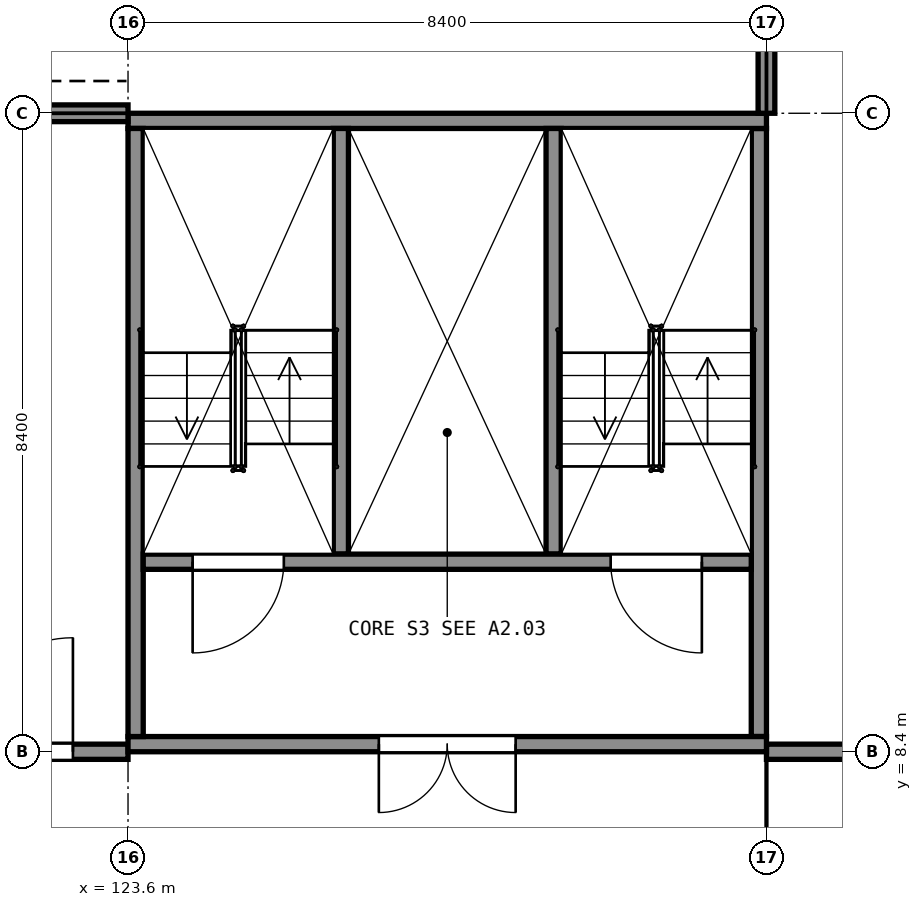
"""IFC4 building model, lengths in metres.
Left out: names, types, materials, properties, quantities, classifications, styles, units other than length and angle.
Written with IfcOpenShell. Run it as: python <this file> out.ifc"""

import sys

from ifc_helpers import new_model, si_unit, direction, frame, frame_2d, origin, place, context, subcontext, project, spatial, rectangle, extrude, element, fill, save


model = new_model("IFC4")
c1 = context("Model", 3, precision=1e-05, world=origin(), true_north=direction((0.0, 1.0)))
c2 = subcontext(c1, "Body", "Model", "MODEL_VIEW")
j1 = project(units=[si_unit("LENGTHUNIT", "METRE"), si_unit("PLANEANGLEUNIT", "RADIAN")], contexts=[c1])
p1 = place(None, origin())
s1 = spatial("IfcSite", under=j1, at=p1, CompositionType="ELEMENT")
p2 = place(p1, origin())
s2 = spatial("IfcBuilding", under=s1, at=p2, CompositionType="ELEMENT")
p3 = place(p2, frame((0.0, 0.0, 20.0)))
s3 = spatial("IfcBuildingStorey", under=s2, at=p3, CompositionType="ELEMENT", Elevation=20.0)
p4 = place(p3, frame((123.6, 8.5, 0.0), z_axis=(0.0, 0.0, 1.0), x_axis=(1.0, 0.0, 0.0)))
e1 = element("IfcWall", 1, at=p4, inside=s3, PredefinedType="SHEAR", context=c2, shape_type="SweptSolid", body=[
    extrude(rectangle(XDim=8.4, YDim=0.2, at=frame_2d((4.2, 0.0))), origin(), (0.0, 0.0, 1.0), 5.0),
])
p5 = place(p4, frame((3.3, 0.0, 0.0)))
e2 = element("IfcOpeningElement", 2, at=p5, cuts=e1, PredefinedType="OPENING", context=c2, shape_type="SweptSolid", body=[
    extrude(rectangle(XDim=1.8, YDim=2.1, at=frame_2d((0.9, 1.05))), frame((0.0, 0.11, 0.0), z_axis=(0.0, -1.0, 0.0), x_axis=(1.0, 0.0, 0.0)), (0.0, 0.0, 1.0), 0.22),
])
p6 = place(p3, frame((123.6, 16.7, 0.0), z_axis=(0.0, 0.0, 1.0), x_axis=(1.0, 0.0, 0.0)))
e3 = element("IfcWall", 3, at=p6, inside=s3, PredefinedType="SHEAR", context=c2, shape_type="SweptSolid", body=[
    extrude(rectangle(XDim=8.4, YDim=0.2, at=frame_2d((4.2, 0.0))), origin(), (0.0, 0.0, 1.0), 5.0),
])
for number, where, z_axis, x_axis in (
    (4, (123.7, 8.6, 0.0), (0.0, 0.0, 1.0), (0.0, 1.0, 0.0)),
    (5, (131.9, 8.6, 0.0), (0.0, 0.0, 1.0), (0.0, 1.0, 0.0)),
):
    element("IfcWall", number, at=place(p3, frame(where, z_axis=z_axis, x_axis=x_axis)), inside=s3, PredefinedType="SHEAR", context=c2, shape_type="SweptSolid", body=[
        extrude(rectangle(XDim=8.0, YDim=0.2, at=frame_2d((4.0, 0.0))), origin(), (0.0, 0.0, 1.0), 5.0),
    ])
p7 = place(p3, frame((123.8, 10.9, 0.0), z_axis=(0.0, 0.0, 1.0), x_axis=(1.0, 0.0, 0.0)))
e6 = element("IfcWall", 6, at=p7, inside=s3, PredefinedType="SHEAR", context=c2, shape_type="SweptSolid", body=[
    extrude(rectangle(XDim=8.0, YDim=0.2, at=frame_2d((4.0, 0.0))), origin(), (0.0, 0.0, 1.0), 5.0),
])
p8 = place(p7, frame((0.65, 0.0, 0.0)))
e7 = element("IfcOpeningElement", 7, at=p8, cuts=e6, PredefinedType="OPENING", context=c2, shape_type="SweptSolid", body=[
    extrude(rectangle(XDim=1.2, YDim=2.1, at=frame_2d((0.6, 1.05))), frame((0.0, 0.11, 0.0), z_axis=(0.0, -1.0, 0.0), x_axis=(1.0, 0.0, 0.0)), (0.0, 0.0, 1.0), 0.22),
])
p9 = place(p7, frame((6.15, 0.0, 0.0)))
e8 = element("IfcOpeningElement", 8, at=p9, cuts=e6, PredefinedType="OPENING", context=c2, shape_type="SweptSolid", body=[
    extrude(rectangle(XDim=1.2, YDim=2.1, at=frame_2d((0.6, 1.05))), frame((0.0, 0.11, 0.0), z_axis=(0.0, -1.0, 0.0), x_axis=(1.0, 0.0, 0.0)), (0.0, 0.0, 1.0), 0.22),
])
for number, where, z_axis, x_axis in (
    (9, (126.4, 11.0, 0.0), (0.0, 0.0, 1.0), (0.0, 1.0, 0.0)),
    (10, (129.2, 11.0, 0.0), (0.0, 0.0, 1.0), (0.0, 1.0, 0.0)),
):
    element("IfcWall", number, at=place(p3, frame(where, z_axis=z_axis, x_axis=x_axis)), inside=s3, PredefinedType="SHEAR", context=c2, shape_type="SweptSolid", body=[
        extrude(rectangle(XDim=5.6, YDim=0.2, at=frame_2d((2.8, 0.0))), origin(), (0.0, 0.0, 1.0), 5.0),
    ])
p10 = place(p3, frame((132.0, 16.8, 0.0), z_axis=(0.0, 0.0, 1.0), x_axis=(0.0, 1.0, 0.0)))
e11 = element("IfcWall", 11, at=p10, inside=s3, PredefinedType="SOLIDWALL", context=c2, shape_type="SweptSolid", body=[
    extrude(rectangle(XDim=8.05, YDim=0.22, at=frame_2d((4.025, 0.0))), origin(), (0.0, 0.0, 1.0), 3.94),
])
p11 = place(p10, frame((2.225, 0.0, 0.9)))
e12 = element("IfcOpeningElement", 12, at=p11, cuts=e11, PredefinedType="OPENING", context=c2, shape_type="SweptSolid", body=[
    extrude(rectangle(XDim=3.6, YDim=1.5, at=frame_2d((1.8, 0.75))), frame((0.0, 0.12, 0.0), z_axis=(0.0, -1.0, 0.0), x_axis=(1.0, 0.0, 0.0)), (0.0, 0.0, 1.0), 0.24),
])
p12 = place(p3, frame((115.55, 16.8, 0.0), z_axis=(0.0, 0.0, 1.0), x_axis=(1.0, 0.0, 0.0)))
e13 = element("IfcWall", 13, at=p12, inside=s3, PredefinedType="SOLIDWALL", context=c2, shape_type="SweptSolid", body=[
    extrude(rectangle(XDim=8.05, YDim=0.22, at=frame_2d((4.025, 0.0))), origin(), (0.0, 0.0, 1.0), 3.94),
])
p13 = place(p12, frame((2.225, 0.0, 0.9)))
e14 = element("IfcOpeningElement", 14, at=p13, cuts=e13, PredefinedType="OPENING", context=c2, shape_type="SweptSolid", body=[
    extrude(rectangle(XDim=3.6, YDim=1.5, at=frame_2d((1.8, 0.75))), frame((0.0, 0.12, 0.0), z_axis=(0.0, -1.0, 0.0), x_axis=(1.0, 0.0, 0.0)), (0.0, 0.0, 1.0), 0.24),
])
p14 = place(p3, frame((132.0, 8.4, 0.0), z_axis=(0.0, 0.0, 1.0), x_axis=(1.0, 0.0, 0.0)))
e15 = element("IfcWall", 15, at=p14, inside=s3, PredefinedType="PARTITIONING", context=c2, shape_type="SweptSolid", body=[
    extrude(rectangle(XDim=8.05, YDim=0.2, at=frame_2d((4.025, 0.0))), origin(), (0.0, 0.0, 1.0), 3.9),
])
p15 = place(p3, frame((115.55, 8.4, 0.0), z_axis=(0.0, 0.0, 1.0), x_axis=(1.0, 0.0, 0.0)))
e16 = element("IfcWall", 16, at=p15, inside=s3, PredefinedType="PARTITIONING", context=c2, shape_type="SweptSolid", body=[
    extrude(rectangle(XDim=8.05, YDim=0.2, at=frame_2d((4.025, 0.0))), origin(), (0.0, 0.0, 1.0), 3.9),
])
p16 = place(p15, frame((4.325, 0.0, 0.0)))
e17 = element("IfcOpeningElement", 17, at=p16, cuts=e16, PredefinedType="OPENING", context=c2, shape_type="SweptSolid", body=[
    extrude(rectangle(XDim=3.0, YDim=3.0, at=frame_2d((1.5, 1.5))), frame((0.0, 0.11, 0.0), z_axis=(0.0, -1.0, 0.0), x_axis=(1.0, 0.0, 0.0)), (0.0, 0.0, 1.0), 0.22),
])
p17 = place(p16, origin())
e18 = element("IfcDoor", 18, at=p17, inside=s3, OperationType="DOUBLE_DOOR_SINGLE_SWING", PredefinedType="DOOR", context=c2, shape_type="SweptSolid", body=[
    extrude(rectangle(XDim=3.0, YDim=3.0, at=frame_2d((1.5, 1.5))), frame((0.0, 0.025, 0.0), z_axis=(0.0, -1.0, 0.0), x_axis=(1.0, 0.0, 0.0)), (0.0, 0.0, 1.0), 0.05),
])
fill(e17, e18)
p18 = place(p5, origin())
e19 = element("IfcDoor", 19, at=p18, inside=s3, OperationType="DOUBLE_DOOR_SINGLE_SWING", PredefinedType="DOOR", context=c2, shape_type="SweptSolid", body=[
    extrude(rectangle(XDim=1.8, YDim=2.1, at=frame_2d((0.9, 1.05))), frame((0.0, 0.025, 0.0), z_axis=(0.0, -1.0, 0.0), x_axis=(1.0, 0.0, 0.0)), (0.0, 0.0, 1.0), 0.05),
])
fill(e2, e19)
p19 = place(p8, origin())
e20 = element("IfcDoor", 20, at=p19, inside=s3, OperationType="SINGLE_SWING_LEFT", PredefinedType="DOOR", context=c2, shape_type="SweptSolid", body=[
    extrude(rectangle(XDim=1.2, YDim=2.1, at=frame_2d((0.6, 1.05))), frame((0.0, 0.025, 0.0), z_axis=(0.0, -1.0, 0.0), x_axis=(1.0, 0.0, 0.0)), (0.0, 0.0, 1.0), 0.05),
])
fill(e7, e20)
p20 = place(p9, origin())
e21 = element("IfcDoor", 21, at=p20, inside=s3, OperationType="SINGLE_SWING_RIGHT", PredefinedType="DOOR", context=c2, shape_type="SweptSolid", body=[
    extrude(rectangle(XDim=1.2, YDim=2.1, at=frame_2d((0.6, 1.05))), frame((0.0, 0.025, 0.0), z_axis=(0.0, -1.0, 0.0), x_axis=(1.0, 0.0, 0.0)), (0.0, 0.0, 1.0), 0.05),
])
fill(e8, e21)
save(model, sys.argv[1])
